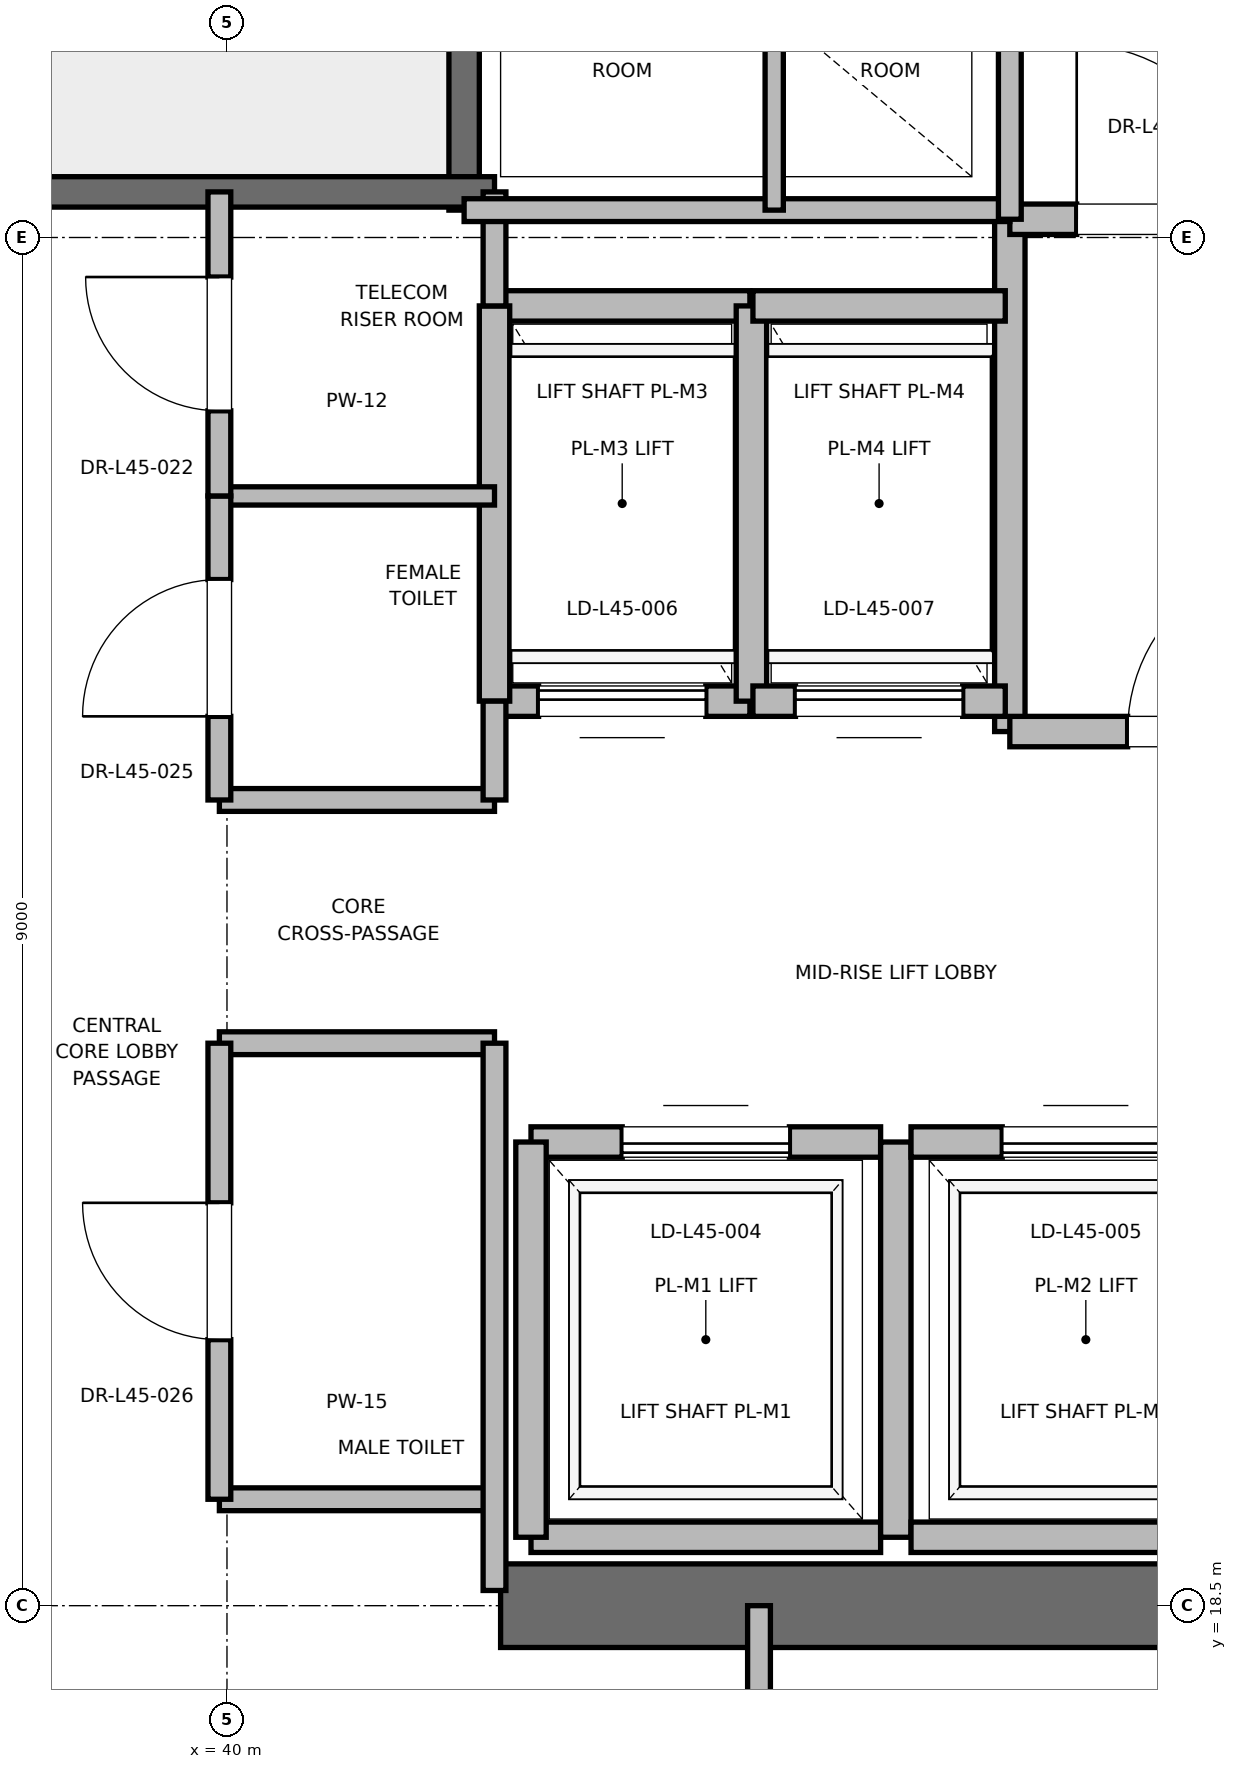
"""IFC4 building model, lengths in metres.
Left out: names, types, materials, properties, quantities, classifications, styles, units other than length and angle.
Written with IfcOpenShell. Run it as: python <this file> out.ifc"""

import sys

from ifc_helpers import new_model, si_unit, direction, frame, frame_2d, origin, place, context, subcontext, project, spatial, rectangle, extrude, element, fill, save


model = new_model("IFC4")
c1 = context("Model", 3, precision=1e-05, world=origin(), true_north=direction((0.0, 1.0)))
c2 = subcontext(c1, "Body", "Model", "MODEL_VIEW")
j1 = project(units=[si_unit("LENGTHUNIT", "METRE"), si_unit("PLANEANGLEUNIT", "RADIAN")], contexts=[c1])
p1 = place(None, origin())
s1 = spatial("IfcSite", under=j1, at=p1, CompositionType="ELEMENT")
p2 = place(p1, origin())
s2 = spatial("IfcBuilding", under=s1, at=p2, CompositionType="ELEMENT")
p3 = place(p2, frame((0.0, 0.0, 194.8)))
s3 = spatial("IfcBuildingStorey", under=s2, at=p3, CompositionType="ELEMENT", Elevation=194.8)
p4 = place(p3, frame((41.8, 18.5, 0.0), z_axis=(0.0, 0.0, 1.0), x_axis=(1.0, 0.0, 0.0)))
e1 = element("IfcWall", 1, at=p4, inside=s3, PredefinedType="SHEAR", context=c2, shape_type="SweptSolid", body=[
    extrude(rectangle(XDim=9.2, YDim=0.55, at=frame_2d((4.6, 0.0))), origin(), (0.0, 0.0, 1.0), 5.1),
])
p5 = place(p3, frame((41.56, 27.68, 0.0), z_axis=(0.0, 0.0, 1.0), x_axis=(0.0, 1.0, 0.0)))
e2 = element("IfcWall", 2, at=p5, inside=s3, PredefinedType="SOLIDWALL", context=c2, shape_type="SweptSolid", body=[
    extrude(rectangle(XDim=8.57, YDim=0.2, at=frame_2d((4.285, 0.0))), origin(), (0.0, 0.0, 1.0), 5.1),
])
p6 = place(p3, frame((38.44, 27.8, 0.0), z_axis=(0.0, 0.0, 1.0), x_axis=(1.0, 0.0, 0.0)))
e3 = element("IfcWall", 3, at=p6, inside=s3, PredefinedType="SOLIDWALL", context=c2, shape_type="SweptSolid", body=[
    extrude(rectangle(XDim=3.32, YDim=0.2, at=frame_2d((1.66, 0.0))), origin(), (0.0, 0.0, 1.0), 5.1),
])
p7 = place(p3, frame((45.15, 24.25, 0.0), z_axis=(0.0, 0.0, 1.0), x_axis=(0.0, 1.0, 0.0)))
e4 = element("IfcWall", 4, at=p7, inside=s3, PredefinedType="PARTITIONING", context=c2, shape_type="SweptSolid", body=[
    extrude(rectangle(XDim=3.37, YDim=0.2, at=frame_2d((1.685, 0.0))), origin(), (0.0, 0.0, 1.0), 5.1),
])
p8 = place(p3, frame((45.15, 24.25, 0.0), z_axis=(0.0, 0.0, 1.0), x_axis=(1.0, 0.0, 0.0)))
e5 = element("IfcWall", 5, at=p8, inside=s3, PredefinedType="PARTITIONING", context=c2, shape_type="SweptSolid", body=[
    extrude(rectangle(XDim=2.7, YDim=0.2, at=frame_2d((1.35, 0.0))), origin(), (0.0, 0.0, 1.0), 5.1),
])
p9 = place(p8, frame((0.775, 0.0, 0.0)))
e6 = element("IfcOpeningElement", 6, at=p9, cuts=e5, PredefinedType="OPENING", context=c2, shape_type="SweptSolid", body=[
    extrude(rectangle(XDim=1.15, YDim=2.2, at=frame_2d((0.575, 1.1))), frame((0.0, 0.1, 0.0), z_axis=(0.0, -1.0, 0.0), x_axis=(1.0, 0.0, 0.0)), (0.0, 0.0, 1.0), 0.2),
])
p10 = place(p3, frame((45.15, 27.62, 0.0), z_axis=(0.0, 0.0, 1.0), x_axis=(1.0, 0.0, 0.0)))
e7 = element("IfcWall", 7, at=p10, inside=s3, PredefinedType="PARTITIONING", context=c2, shape_type="SweptSolid", body=[
    extrude(rectangle(XDim=2.03, YDim=0.2, at=frame_2d((1.015, 0.0))), origin(), (0.0, 0.0, 1.0), 5.1),
])
p11 = place(p10, frame((0.44, 0.0, 0.0)))
e8 = element("IfcOpeningElement", 8, at=p11, cuts=e7, PredefinedType="OPENING", context=c2, shape_type="SweptSolid", body=[
    extrude(rectangle(XDim=1.15, YDim=2.2, at=frame_2d((0.575, 1.1))), frame((0.0, 0.1, 0.0), z_axis=(0.0, -1.0, 0.0), x_axis=(1.0, 0.0, 0.0)), (0.0, 0.0, 1.0), 0.2),
])
p12 = place(p3, frame((42.0, 18.95, 0.0), z_axis=(0.0, 0.0, 1.0), x_axis=(1.0, 0.0, 0.0)))
e9 = element("IfcWall", 9, at=p12, inside=s3, PredefinedType="SOLIDWALL", context=c2, shape_type="SweptSolid", body=[
    extrude(rectangle(XDim=2.3, YDim=0.2, at=frame_2d((1.15, 0.0))), origin(), (0.0, 0.0, 1.0), 4.08),
])
p13 = place(p3, frame((44.3, 21.55, 0.0), z_axis=(0.0, 0.0, 1.0), x_axis=(-1.0, 0.0, 0.0)))
e10 = element("IfcWall", 10, at=p13, inside=s3, PredefinedType="SOLIDWALL", context=c2, shape_type="SweptSolid", body=[
    extrude(rectangle(XDim=2.3, YDim=0.2, at=frame_2d((1.15, 0.0))), origin(), (0.0, 0.0, 1.0), 5.1),
])
p14 = place(p13, frame((0.6, 0.0, 0.0)))
e11 = element("IfcOpeningElement", 11, at=p14, cuts=e10, PredefinedType="OPENING", context=c2, shape_type="SweptSolid", body=[
    extrude(rectangle(XDim=1.1, YDim=2.2, at=frame_2d((0.55, 1.1))), frame((0.0, 0.1, 0.0), z_axis=(0.0, -1.0, 0.0), x_axis=(1.0, 0.0, 0.0)), (0.0, 0.0, 1.0), 0.2),
])
p15 = place(p3, frame((42.0, 21.55, 0.0), z_axis=(0.0, 0.0, 1.0), x_axis=(0.0, -1.0, 0.0)))
e12 = element("IfcWall", 12, at=p15, inside=s3, PredefinedType="SOLIDWALL", context=c2, shape_type="SweptSolid", body=[
    extrude(rectangle(XDim=2.6, YDim=0.2, at=frame_2d((1.3, 0.0))), origin(), (0.0, 0.0, 1.0), 4.08),
])
p16 = place(p3, frame((44.4, 18.95, 0.0), z_axis=(0.0, 0.0, 1.0), x_axis=(0.0, 1.0, 0.0)))
e13 = element("IfcWall", 13, at=p16, inside=s3, PredefinedType="SOLIDWALL", context=c2, shape_type="SweptSolid", body=[
    extrude(rectangle(XDim=2.6, YDim=0.2, at=frame_2d((1.3, 0.0))), origin(), (0.0, 0.0, 1.0), 5.1),
])
p17 = place(p3, frame((44.5, 18.95, 0.0), z_axis=(0.0, 0.0, 1.0), x_axis=(1.0, 0.0, 0.0)))
e14 = element("IfcWall", 14, at=p17, inside=s3, PredefinedType="SOLIDWALL", context=c2, shape_type="SweptSolid", body=[
    extrude(rectangle(XDim=2.3, YDim=0.2, at=frame_2d((1.15, 0.0))), origin(), (0.0, 0.0, 1.0), 5.1),
])
p18 = place(p3, frame((46.8, 21.55, 0.0), z_axis=(0.0, 0.0, 1.0), x_axis=(-1.0, 0.0, 0.0)))
e15 = element("IfcWall", 15, at=p18, inside=s3, PredefinedType="SOLIDWALL", context=c2, shape_type="SweptSolid", body=[
    extrude(rectangle(XDim=2.3, YDim=0.2, at=frame_2d((1.15, 0.0))), origin(), (0.0, 0.0, 1.0), 5.1),
])
p19 = place(p18, frame((0.6, 0.0, 0.0)))
e16 = element("IfcOpeningElement", 16, at=p19, cuts=e15, PredefinedType="OPENING", context=c2, shape_type="SweptSolid", body=[
    extrude(rectangle(XDim=1.1, YDim=2.2, at=frame_2d((0.55, 1.1))), frame((0.0, 0.1, 0.0), z_axis=(0.0, -1.0, 0.0), x_axis=(1.0, 0.0, 0.0)), (0.0, 0.0, 1.0), 0.2),
])
p20 = place(p3, frame((41.76, 24.45, 0.0), z_axis=(0.0, 0.0, 1.0), x_axis=(1.0, 0.0, 0.0)))
e17 = element("IfcWall", 17, at=p20, inside=s3, PredefinedType="SOLIDWALL", context=c2, shape_type="SweptSolid", body=[
    extrude(rectangle(XDim=1.68, YDim=0.2, at=frame_2d((0.84, 0.0))), origin(), (0.0, 0.0, 1.0), 5.1),
])
p21 = place(p20, frame((0.29, 0.0, 0.0)))
e18 = element("IfcOpeningElement", 18, at=p21, cuts=e17, PredefinedType="OPENING", context=c2, shape_type="SweptSolid", body=[
    extrude(rectangle(XDim=1.1, YDim=2.2, at=frame_2d((0.55, 1.1))), frame((0.0, 0.1, 0.0), z_axis=(0.0, -1.0, 0.0), x_axis=(1.0, 0.0, 0.0)), (0.0, 0.0, 1.0), 0.2),
])
p22 = place(p3, frame((43.44, 27.05, 0.0), z_axis=(0.0, 0.0, 1.0), x_axis=(-1.0, 0.0, 0.0)))
e19 = element("IfcWall", 19, at=p22, inside=s3, PredefinedType="SOLIDWALL", context=c2, shape_type="SweptSolid", body=[
    extrude(rectangle(XDim=1.68, YDim=0.2, at=frame_2d((0.84, 0.0))), origin(), (0.0, 0.0, 1.0), 5.1),
])
for number, where, z_axis, x_axis in (
    (20, (41.76, 27.05, 0.0), (0.0, 0.0, 1.0), (0.0, -1.0, 0.0)),
    (21, (43.45, 24.45, 0.0), (0.0, 0.0, 1.0), (0.0, 1.0, 0.0)),
):
    element("IfcWall", number, at=place(p3, frame(where, z_axis=z_axis, x_axis=x_axis)), inside=s3, PredefinedType="SOLIDWALL", context=c2, shape_type="SweptSolid", body=[
        extrude(rectangle(XDim=2.6, YDim=0.2, at=frame_2d((1.3, 0.0))), origin(), (0.0, 0.0, 1.0), 5.1),
    ])
p23 = place(p3, frame((43.46, 24.45, 0.0), z_axis=(0.0, 0.0, 1.0), x_axis=(1.0, 0.0, 0.0)))
e22 = element("IfcWall", 22, at=p23, inside=s3, PredefinedType="SOLIDWALL", context=c2, shape_type="SweptSolid", body=[
    extrude(rectangle(XDim=1.66, YDim=0.2, at=frame_2d((0.83, 0.0))), origin(), (0.0, 0.0, 1.0), 5.1),
])
p24 = place(p23, frame((0.28, 0.0, 0.0)))
e23 = element("IfcOpeningElement", 23, at=p24, cuts=e22, PredefinedType="OPENING", context=c2, shape_type="SweptSolid", body=[
    extrude(rectangle(XDim=1.1, YDim=2.2, at=frame_2d((0.55, 1.1))), frame((0.0, 0.1, 0.0), z_axis=(0.0, -1.0, 0.0), x_axis=(1.0, 0.0, 0.0)), (0.0, 0.0, 1.0), 0.2),
])
p25 = place(p3, frame((45.12, 27.05, 0.0), z_axis=(0.0, 0.0, 1.0), x_axis=(-1.0, 0.0, 0.0)))
e24 = element("IfcWall", 24, at=p25, inside=s3, PredefinedType="SOLIDWALL", context=c2, shape_type="SweptSolid", body=[
    extrude(rectangle(XDim=1.66, YDim=0.2, at=frame_2d((0.83, 0.0))), origin(), (0.0, 0.0, 1.0), 5.1),
])
for number, where, z_axis, x_axis in (
    (25, (39.95, 19.2, 0.0), (0.0, 0.0, 1.0), (1.0, 0.0, 0.0)),
    (26, (39.95, 22.2, 0.0), (0.0, 0.0, 1.0), (1.0, 0.0, 0.0)),
    (27, (39.95, 23.8, 0.0), (0.0, 0.0, 1.0), (1.0, 0.0, 0.0)),
):
    element("IfcWall", number, at=place(p3, frame(where, z_axis=z_axis, x_axis=x_axis)), inside=s3, PredefinedType="PARTITIONING", context=c2, shape_type="SweptSolid", body=[
        extrude(rectangle(XDim=1.81, YDim=0.15, at=frame_2d((0.905, 0.0))), origin(), (0.0, 0.0, 1.0), 2.85),
    ])
p26 = place(p3, frame((39.95, 25.8, 0.0), z_axis=(0.0, 0.0, 1.0), x_axis=(1.0, 0.0, 0.0)))
e28 = element("IfcWall", 28, at=p26, inside=s3, PredefinedType="PARTITIONING", context=c2, shape_type="SweptSolid", body=[
    extrude(rectangle(XDim=1.81, YDim=0.12, at=frame_2d((0.905, 0.0))), origin(), (0.0, 0.0, 1.0), 2.85),
])
p27 = place(p3, frame((41.76, 18.6, 0.0), z_axis=(0.0, 0.0, 1.0), x_axis=(0.0, 1.0, 0.0)))
e29 = element("IfcWall", 29, at=p27, inside=s3, PredefinedType="PARTITIONING", context=c2, shape_type="SweptSolid", body=[
    extrude(rectangle(XDim=3.6, YDim=0.15, at=frame_2d((1.8, 0.0))), origin(), (0.0, 0.0, 1.0), 2.85),
])
p28 = place(p3, frame((41.76, 23.8, 0.0), z_axis=(0.0, 0.0, 1.0), x_axis=(0.0, 1.0, 0.0)))
e30 = element("IfcWall", 30, at=p28, inside=s3, PredefinedType="PARTITIONING", context=c2, shape_type="SweptSolid", body=[
    extrude(rectangle(XDim=0.65, YDim=0.15, at=frame_2d((0.325, 0.0))), origin(), (0.0, 0.0, 1.0), 2.85),
])
p29 = place(p3, frame((41.76, 27.05, 0.0), z_axis=(0.0, 0.0, 1.0), x_axis=(0.0, 1.0, 0.0)))
e31 = element("IfcWall", 31, at=p29, inside=s3, PredefinedType="PARTITIONING", context=c2, shape_type="SweptSolid", body=[
    extrude(rectangle(XDim=0.75, YDim=0.15, at=frame_2d((0.375, 0.0))), origin(), (0.0, 0.0, 1.0), 2.85),
])
p30 = place(p3, frame((39.95, 19.2, 0.0), z_axis=(0.0, 0.0, 1.0), x_axis=(0.0, 1.0, 0.0)))
e32 = element("IfcWall", 32, at=p30, inside=s3, PredefinedType="PARTITIONING", context=c2, shape_type="SweptSolid", body=[
    extrude(rectangle(XDim=3.0, YDim=0.15, at=frame_2d((1.5, 0.0))), origin(), (0.0, 0.0, 1.0), 2.85),
])
p31 = place(p30, frame((1.05, 0.0, 0.0)))
e33 = element("IfcOpeningElement", 33, at=p31, cuts=e32, PredefinedType="OPENING", context=c2, shape_type="SweptSolid", body=[
    extrude(rectangle(XDim=0.9, YDim=2.1, at=frame_2d((0.45, 1.05))), frame((0.0, 0.075, 0.0), z_axis=(0.0, -1.0, 0.0), x_axis=(1.0, 0.0, 0.0)), (0.0, 0.0, 1.0), 0.15),
])
p32 = place(p3, frame((39.95, 23.8, 0.0), z_axis=(0.0, 0.0, 1.0), x_axis=(0.0, 1.0, 0.0)))
e34 = element("IfcWall", 34, at=p32, inside=s3, PredefinedType="PARTITIONING", context=c2, shape_type="SweptSolid", body=[
    extrude(rectangle(XDim=2.0, YDim=0.15, at=frame_2d((1.0, 0.0))), origin(), (0.0, 0.0, 1.0), 2.85),
])
p33 = place(p32, frame((0.55, 0.0, 0.0)))
e35 = element("IfcOpeningElement", 35, at=p33, cuts=e34, PredefinedType="OPENING", context=c2, shape_type="SweptSolid", body=[
    extrude(rectangle(XDim=0.9, YDim=2.1, at=frame_2d((0.45, 1.05))), frame((0.0, 0.075, 0.0), z_axis=(0.0, -1.0, 0.0), x_axis=(1.0, 0.0, 0.0)), (0.0, 0.0, 1.0), 0.15),
])
p34 = place(p3, frame((39.95, 25.8, 0.0), z_axis=(0.0, 0.0, 1.0), x_axis=(0.0, 1.0, 0.0)))
e36 = element("IfcWall", 36, at=p34, inside=s3, PredefinedType="PARTITIONING", context=c2, shape_type="SweptSolid", body=[
    extrude(rectangle(XDim=2.0, YDim=0.15, at=frame_2d((1.0, 0.0))), origin(), (0.0, 0.0, 1.0), 2.85),
])
p35 = place(p34, frame((0.56, 0.0, 0.0)))
e37 = element("IfcOpeningElement", 37, at=p35, cuts=e36, PredefinedType="OPENING", context=c2, shape_type="SweptSolid", body=[
    extrude(rectangle(XDim=0.88, YDim=2.1, at=frame_2d((0.44, 1.05))), frame((0.0, 0.075, 0.0), z_axis=(0.0, -1.0, 0.0), x_axis=(1.0, 0.0, 0.0)), (0.0, 0.0, 1.0), 0.15),
])
p36 = place(p3, frame((41.56, 27.68, 0.0), z_axis=(0.0, 0.0, 1.0), x_axis=(1.0, 0.0, 0.0)))
e38 = element("IfcWall", 38, at=p36, inside=s3, PredefinedType="PARTITIONING", context=c2, shape_type="SweptSolid", body=[
    extrude(rectangle(XDim=3.59, YDim=0.15, at=frame_2d((1.795, 0.0))), origin(), (0.0, 0.0, 1.0), 2.85),
])
p37 = place(p3, frame((45.15, 27.62, 0.0), z_axis=(0.0, 0.0, 1.0), x_axis=(0.0, 1.0, 0.0)))
e39 = element("IfcWall", 39, at=p37, inside=s3, PredefinedType="PARTITIONING", context=c2, shape_type="SweptSolid", body=[
    extrude(rectangle(XDim=3.1, YDim=0.15, at=frame_2d((1.55, 0.0))), origin(), (0.0, 0.0, 1.0), 2.85),
])
p38 = place(p3, frame((43.6, 27.68, 0.0), z_axis=(0.0, 0.0, 1.0), x_axis=(0.0, 1.0, 0.0)))
e40 = element("IfcWall", 40, at=p38, inside=s3, PredefinedType="PARTITIONING", context=c2, shape_type="SweptSolid", body=[
    extrude(rectangle(XDim=3.04, YDim=0.12, at=frame_2d((1.52, 0.0))), origin(), (0.0, 0.0, 1.0), 2.85),
])
p39 = place(p3, frame((43.5, 15.8, 0.0), z_axis=(0.0, 0.0, 1.0), x_axis=(0.0, 1.0, 0.0)))
e41 = element("IfcWall", 41, at=p39, inside=s3, PredefinedType="PARTITIONING", context=c2, shape_type="SweptSolid", body=[
    extrude(rectangle(XDim=2.7, YDim=0.15, at=frame_2d((1.35, 0.0))), origin(), (0.0, 0.0, 1.0), 2.85),
])
p40 = place(p39, frame((0.875, 0.0, 0.0)))
e42 = element("IfcOpeningElement", 42, at=p40, cuts=e41, PredefinedType="OPENING", context=c2, shape_type="SweptSolid", body=[
    extrude(rectangle(XDim=0.95, YDim=2.15, at=frame_2d((0.475, 1.075))), frame((0.0, 0.075, 0.0), z_axis=(0.0, -1.0, 0.0), x_axis=(1.0, 0.0, 0.0)), (0.0, 0.0, 1.0), 0.15),
])
p41 = place(p9, origin())
e43 = element("IfcDoor", 43, at=p41, inside=s3, OperationType="SINGLE_SWING_RIGHT", PredefinedType="DOOR", context=c2, shape_type="SweptSolid", body=[
    extrude(rectangle(XDim=1.15, YDim=2.2, at=frame_2d((0.575, 1.1))), frame((0.0, 0.025, 0.0), z_axis=(0.0, -1.0, 0.0), x_axis=(1.0, 0.0, 0.0)), (0.0, 0.0, 1.0), 0.05),
])
fill(e6, e43)
p42 = place(p11, origin())
e44 = element("IfcDoor", 44, at=p42, inside=s3, OperationType="SINGLE_SWING_LEFT", PredefinedType="DOOR", context=c2, shape_type="SweptSolid", body=[
    extrude(rectangle(XDim=1.15, YDim=2.2, at=frame_2d((0.575, 1.1))), frame((0.0, 0.025, 0.0), z_axis=(0.0, -1.0, 0.0), x_axis=(1.0, 0.0, 0.0)), (0.0, 0.0, 1.0), 0.05),
])
fill(e8, e44)
p43 = place(p14, origin())
e45 = element("IfcDoor", 45, at=p43, inside=s3, OperationType="SLIDING_TO_RIGHT", PredefinedType="DOOR", context=c2, shape_type="SweptSolid", body=[
    extrude(rectangle(XDim=1.1, YDim=2.2, at=frame_2d((0.55, 1.1))), frame((0.0, 0.025, 0.0), z_axis=(0.0, -1.0, 0.0), x_axis=(1.0, 0.0, 0.0)), (0.0, 0.0, 1.0), 0.05),
])
fill(e11, e45)
p44 = place(p19, origin())
e46 = element("IfcDoor", 46, at=p44, inside=s3, OperationType="SLIDING_TO_RIGHT", PredefinedType="DOOR", context=c2, shape_type="SweptSolid", body=[
    extrude(rectangle(XDim=1.1, YDim=2.2, at=frame_2d((0.55, 1.1))), frame((0.0, 0.025, 0.0), z_axis=(0.0, -1.0, 0.0), x_axis=(1.0, 0.0, 0.0)), (0.0, 0.0, 1.0), 0.05),
])
fill(e16, e46)
p45 = place(p21, origin())
e47 = element("IfcDoor", 47, at=p45, inside=s3, OperationType="SLIDING_TO_RIGHT", PredefinedType="DOOR", context=c2, shape_type="SweptSolid", body=[
    extrude(rectangle(XDim=1.1, YDim=2.2, at=frame_2d((0.55, 1.1))), frame((0.0, 0.025, 0.0), z_axis=(0.0, -1.0, 0.0), x_axis=(1.0, 0.0, 0.0)), (0.0, 0.0, 1.0), 0.05),
])
fill(e18, e47)
p46 = place(p24, origin())
e48 = element("IfcDoor", 48, at=p46, inside=s3, OperationType="SLIDING_TO_RIGHT", PredefinedType="DOOR", context=c2, shape_type="SweptSolid", body=[
    extrude(rectangle(XDim=1.1, YDim=2.2, at=frame_2d((0.55, 1.1))), frame((0.0, 0.025, 0.0), z_axis=(0.0, -1.0, 0.0), x_axis=(1.0, 0.0, 0.0)), (0.0, 0.0, 1.0), 0.05),
])
fill(e23, e48)
p47 = place(p31, origin())
e49 = element("IfcDoor", 49, at=p47, inside=s3, OperationType="SINGLE_SWING_RIGHT", PredefinedType="DOOR", context=c2, shape_type="SweptSolid", body=[
    extrude(rectangle(XDim=0.9, YDim=2.1, at=frame_2d((0.45, 1.05))), frame((0.0, 0.025, 0.0), z_axis=(0.0, -1.0, 0.0), x_axis=(1.0, 0.0, 0.0)), (0.0, 0.0, 1.0), 0.05),
])
fill(e33, e49)
p48 = place(p33, origin())
e50 = element("IfcDoor", 50, at=p48, inside=s3, OperationType="SINGLE_SWING_LEFT", PredefinedType="DOOR", context=c2, shape_type="SweptSolid", body=[
    extrude(rectangle(XDim=0.9, YDim=2.1, at=frame_2d((0.45, 1.05))), frame((0.0, 0.025, 0.0), z_axis=(0.0, -1.0, 0.0), x_axis=(1.0, 0.0, 0.0)), (0.0, 0.0, 1.0), 0.05),
])
fill(e35, e50)
p49 = place(p35, origin())
e51 = element("IfcDoor", 51, at=p49, inside=s3, OperationType="SINGLE_SWING_RIGHT", PredefinedType="DOOR", context=c2, shape_type="SweptSolid", body=[
    extrude(rectangle(XDim=0.88, YDim=2.1, at=frame_2d((0.44, 1.05))), frame((0.0, 0.025, 0.0), z_axis=(0.0, -1.0, 0.0), x_axis=(1.0, 0.0, 0.0)), (0.0, 0.0, 1.0), 0.05),
])
fill(e37, e51)
save(model, sys.argv[1])
